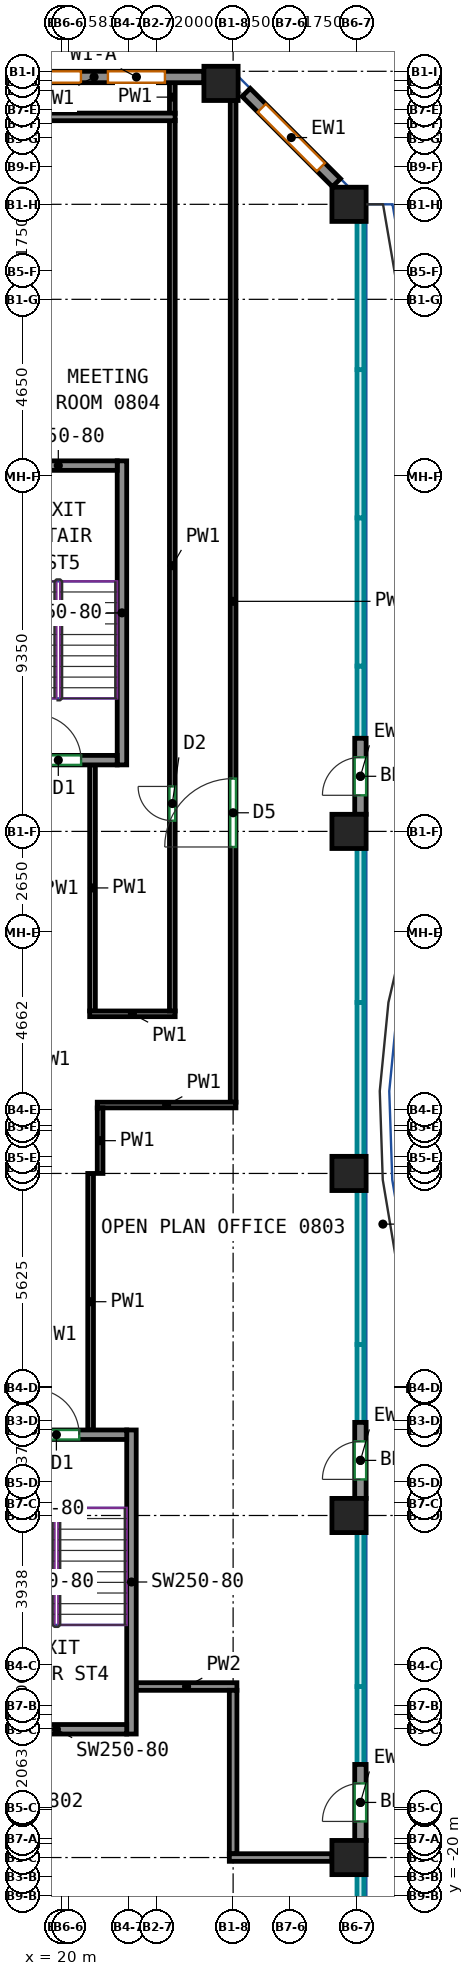
"""IFC4 building model, lengths in metres.
Left out: names, types, materials, properties, quantities, classifications, styles, units other than length and angle.
Written with IfcOpenShell. Run it as: python <this file> out.ifc"""

import sys

from ifc_helpers import new_model, si_unit, direction, frame, frame_2d, origin, origin_2d, place, context, subcontext, project, spatial, rectangle, extrude, source, transform, mapped, element, fill, save


model = new_model("IFC4")
c1 = context("Model", 3, precision=1e-05, world=origin(), true_north=direction((0.0, 1.0)))
c2 = subcontext(c1, "Body", "Model", "MODEL_VIEW")
j1 = project(units=[si_unit("LENGTHUNIT", "METRE"), si_unit("PLANEANGLEUNIT", "RADIAN")], contexts=[c1])
p1 = place(None, origin())
s1 = spatial("IfcSite", under=j1, at=p1, CompositionType="ELEMENT")
p2 = place(p1, origin())
s2 = spatial("IfcBuilding", under=s1, at=p2, CompositionType="ELEMENT")
p3 = place(p2, frame((0.0, 0.0, 39.0)))
s3 = spatial("IfcBuildingStorey", under=s2, at=p3, CompositionType="ELEMENT", Elevation=39.0)
m1 = source(origin(), c2, "Body", "SweptSolid", [
    extrude(rectangle(XDim=0.9, YDim=0.9, at=origin_2d()), origin(), (0.0, 0.0, 1.0), 3.72),
])
for number, where, z_axis, x_axis in (
    (1, (24.182, 27.682, 0.0), (0.0, 0.0, 1.0), (1.0, 0.0, 0.0)),
    (2, (27.55, -19.0, 0.0), (0.0, 0.0, 1.0), (1.0, 0.0, 0.0)),
    (3, (27.55, -10.0, 0.0), (0.0, 0.0, 1.0), (1.0, 0.0, 0.0)),
    (4, (27.55, -1.0, 0.0), (0.0, 0.0, 1.0), (1.0, 0.0, 0.0)),
    (5, (27.55, 8.0, 0.0), (0.0, 0.0, 1.0), (1.0, 0.0, 0.0)),
    (6, (27.55, 24.5, 0.0), (0.0, 0.0, 1.0), (1.0, 0.0, 0.0)),
):
    element("IfcColumn", number, at=place(p3, frame(where, z_axis=z_axis, x_axis=x_axis)), inside=s3, PredefinedType="COLUMN", context=c2, shape_type="MappedRepresentation", body=[
        mapped(m1, transform((0.0, 0.0, 0.0))),
    ])
m2 = source(origin(), c2, "Body", "SweptSolid", [
    extrude(rectangle(XDim=8.0, YDim=0.25, at=frame_2d((4.0, 0.0))), origin(), (0.0, 0.0, 1.0), 3.72),
])
p4 = place(p3, frame((21.825, -15.75, 0.0), z_axis=(0.0, 0.0, 1.0), x_axis=(0.0, 1.0, 0.0)))
e7 = element("IfcWall", 7, at=p4, inside=s3, PredefinedType="SHEAR", context=c2, shape_type="MappedRepresentation", body=[
    mapped(m2, transform((0.0, 0.0, 0.0))),
])
m3 = source(origin(), c2, "Body", "SweptSolid", [
    extrude(rectangle(XDim=3.7, YDim=0.25, at=frame_2d((1.85, 0.0))), origin(), (0.0, 0.0, 1.0), 3.72),
])
p5 = place(p3, frame((18.0, -15.625, 0.0), z_axis=(0.0, 0.0, 1.0), x_axis=(1.0, 0.0, 0.0)))
e8 = element("IfcWall", 8, at=p5, inside=s3, PredefinedType="SHEAR", context=c2, shape_type="MappedRepresentation", body=[
    mapped(m3, transform((0.0, 0.0, 0.0))),
])
p6 = place(p3, frame((18.0, -7.875, 0.0), z_axis=(0.0, 0.0, 1.0), x_axis=(1.0, 0.0, 0.0)))
e9 = element("IfcWall", 9, at=p6, inside=s3, PredefinedType="SHEAR", context=c2, shape_type="MappedRepresentation", body=[
    mapped(m3, transform((0.0, 0.0, 0.0))),
])
p7 = place(p6, frame((1.25, 0.0, 0.0)))
e10 = element("IfcOpeningElement", 10, at=p7, cuts=e9, PredefinedType="OPENING", context=c2, shape_type="SweptSolid", body=[
    extrude(rectangle(XDim=1.2, YDim=2.1, at=frame_2d((0.6, 1.05))), frame((0.0, 0.135, 0.0), z_axis=(0.0, -1.0, 0.0), x_axis=(1.0, 0.0, 0.0)), (0.0, 0.0, 1.0), 0.27),
])
p8 = place(p3, frame((21.575, 9.75, 0.0), z_axis=(0.0, 0.0, 1.0), x_axis=(0.0, 1.0, 0.0)))
e11 = element("IfcWall", 11, at=p8, inside=s3, PredefinedType="SHEAR", context=c2, shape_type="MappedRepresentation", body=[
    mapped(m2, transform((0.0, 0.0, 0.0))),
])
m4 = source(origin(), c2, "Body", "SweptSolid", [
    extrude(rectangle(XDim=3.1, YDim=0.25, at=frame_2d((1.55, 0.0))), origin(), (0.0, 0.0, 1.0), 3.72),
])
p9 = place(p3, frame((18.35, 9.875, 0.0), z_axis=(0.0, 0.0, 1.0), x_axis=(1.0, 0.0, 0.0)))
e12 = element("IfcWall", 12, at=p9, inside=s3, PredefinedType="SHEAR", context=c2, shape_type="MappedRepresentation", body=[
    mapped(m4, transform((0.0, 0.0, 0.0))),
])
p10 = place(p9, frame((0.95, 0.0, 0.0)))
e13 = element("IfcOpeningElement", 13, at=p10, cuts=e12, PredefinedType="OPENING", context=c2, shape_type="SweptSolid", body=[
    extrude(rectangle(XDim=1.2, YDim=2.1, at=frame_2d((0.6, 1.05))), frame((0.0, 0.135, 0.0), z_axis=(0.0, -1.0, 0.0), x_axis=(1.0, 0.0, 0.0)), (0.0, 0.0, 1.0), 0.27),
])
p11 = place(p3, frame((18.35, 17.625, 0.0), z_axis=(0.0, 0.0, 1.0), x_axis=(1.0, 0.0, 0.0)))
e14 = element("IfcWall", 14, at=p11, inside=s3, PredefinedType="SHEAR", context=c2, shape_type="MappedRepresentation", body=[
    mapped(m4, transform((0.0, 0.0, 0.0))),
])
m5 = source(origin(), c2, "Body", "SweptSolid", [
    extrude(rectangle(XDim=2.0, YDim=0.3, at=frame_2d((1.0, 0.0))), origin(), (0.0, 0.0, 1.0), 3.72),
])
p12 = place(p3, frame((27.85, -18.55, 0.0), z_axis=(0.0, 0.0, 1.0), x_axis=(0.0, 1.0, 0.0)))
e15 = element("IfcWall", 15, at=p12, inside=s3, PredefinedType="SOLIDWALL", context=c2, shape_type="MappedRepresentation", body=[
    mapped(m5, transform((0.0, 0.0, 0.0))),
])
p13 = place(p12, frame((0.5, 0.0, 0.0)))
e16 = element("IfcOpeningElement", 16, at=p13, cuts=e15, PredefinedType="OPENING", context=c2, shape_type="SweptSolid", body=[
    extrude(rectangle(XDim=1.0, YDim=2.1, at=frame_2d((0.5, 1.05))), frame((0.0, 0.16, 0.0), z_axis=(0.0, -1.0, 0.0), x_axis=(1.0, 0.0, 0.0)), (0.0, 0.0, 1.0), 0.32),
])
p14 = place(p3, frame((27.85, -9.55, 0.0), z_axis=(0.0, 0.0, 1.0), x_axis=(0.0, 1.0, 0.0)))
e17 = element("IfcWall", 17, at=p14, inside=s3, PredefinedType="SOLIDWALL", context=c2, shape_type="MappedRepresentation", body=[
    mapped(m5, transform((0.0, 0.0, 0.0))),
])
p15 = place(p14, frame((0.5, 0.0, 0.0)))
e18 = element("IfcOpeningElement", 18, at=p15, cuts=e17, PredefinedType="OPENING", context=c2, shape_type="SweptSolid", body=[
    extrude(rectangle(XDim=1.0, YDim=2.1, at=frame_2d((0.5, 1.05))), frame((0.0, 0.16, 0.0), z_axis=(0.0, -1.0, 0.0), x_axis=(1.0, 0.0, 0.0)), (0.0, 0.0, 1.0), 0.32),
])
p16 = place(p3, frame((27.85, 8.45, 0.0), z_axis=(0.0, 0.0, 1.0), x_axis=(0.0, 1.0, 0.0)))
e19 = element("IfcWall", 19, at=p16, inside=s3, PredefinedType="SOLIDWALL", context=c2, shape_type="MappedRepresentation", body=[
    mapped(m5, transform((0.0, 0.0, 0.0))),
])
p17 = place(p16, frame((0.5, 0.0, 0.0)))
e20 = element("IfcOpeningElement", 20, at=p17, cuts=e19, PredefinedType="OPENING", context=c2, shape_type="SweptSolid", body=[
    extrude(rectangle(XDim=1.0, YDim=2.1, at=frame_2d((0.5, 1.05))), frame((0.0, 0.16, 0.0), z_axis=(0.0, -1.0, 0.0), x_axis=(1.0, 0.0, 0.0)), (0.0, 0.0, 1.0), 0.32),
])
m6 = source(origin(), c2, "Body", "SweptSolid", [
    extrude(rectangle(XDim=3.359, YDim=0.3, at=frame_2d((1.679, 0.0))), origin(), (0.0, 0.0, 1.0), 3.72),
])
p18 = place(p3, frame((27.219, 25.069, 0.0), z_axis=(0.0, 0.0, 1.0), x_axis=(-0.707070438228, 0.707143122278, 0.0)))
e21 = element("IfcWall", 21, at=p18, inside=s3, PredefinedType="SOLIDWALL", context=c2, shape_type="MappedRepresentation", body=[
    mapped(m6, transform((0.0, 0.0, 0.0))),
])
p19 = place(p18, frame((0.579, 0.0, 0.7)))
e22 = element("IfcOpeningElement", 22, at=p19, cuts=e21, PredefinedType="OPENING", context=c2, shape_type="SweptSolid", body=[
    extrude(rectangle(XDim=2.2, YDim=2.25, at=frame_2d((1.1, 1.125))), frame((0.0, 0.16, 0.0), z_axis=(0.0, -1.0, 0.0), x_axis=(1.0, 0.0, 0.0)), (0.0, 0.0, 1.0), 0.32),
])
m7 = source(origin(), c2, "Body", "SweptSolid", [
    extrude(rectangle(XDim=5.782, YDim=0.3, at=frame_2d((2.891, 0.0))), origin(), (0.0, 0.0, 1.0), 3.72),
])
p20 = place(p3, frame((23.732, 27.85, 0.0), z_axis=(0.0, 0.0, 1.0), x_axis=(-1.0, 0.0, 0.0)))
e23 = element("IfcWall", 23, at=p20, inside=s3, PredefinedType="SOLIDWALL", context=c2, shape_type="MappedRepresentation", body=[
    mapped(m7, transform((0.0, 0.0, 0.0))),
])
p21 = place(p20, frame((1.026, 0.0, 0.7)))
e24 = element("IfcOpeningElement", 24, at=p21, cuts=e23, PredefinedType="OPENING", context=c2, shape_type="SweptSolid", body=[
    extrude(rectangle(XDim=1.5, YDim=2.25, at=frame_2d((0.75, 1.125))), frame((0.0, 0.16, 0.0), z_axis=(0.0, -1.0, 0.0), x_axis=(1.0, 0.0, 0.0)), (0.0, 0.0, 1.0), 0.32),
])
p22 = place(p20, frame((3.236, 0.0, 0.7)))
e25 = element("IfcOpeningElement", 25, at=p22, cuts=e23, PredefinedType="OPENING", context=c2, shape_type="SweptSolid", body=[
    extrude(rectangle(XDim=2.2, YDim=2.25, at=frame_2d((1.1, 1.125))), frame((0.0, 0.16, 0.0), z_axis=(0.0, -1.0, 0.0), x_axis=(1.0, 0.0, 0.0)), (0.0, 0.0, 1.0), 0.32),
])
p23 = place(p3, frame((20.8, 3.275, 0.0), z_axis=(0.0, 0.0, 1.0), x_axis=(0.0, 1.0, 0.0)))
e26 = element("IfcWall", 26, at=p23, inside=s3, PredefinedType="PARTITIONING", context=c2, shape_type="SweptSolid", body=[
    extrude(rectangle(XDim=6.475, YDim=0.15, at=frame_2d((3.238, 0.0))), origin(), (0.0, 0.0, 1.0), 3.72),
])
p24 = place(p3, frame((20.725, 3.2, 0.0), z_axis=(0.0, 0.0, 1.0), x_axis=(1.0, 0.0, 0.0)))
e27 = element("IfcWall", 27, at=p24, inside=s3, PredefinedType="PARTITIONING", context=c2, shape_type="SweptSolid", body=[
    extrude(rectangle(XDim=2.25, YDim=0.15, at=frame_2d((1.125, 0.0))), origin(), (0.0, 0.0, 1.0), 3.72),
])
p25 = place(p3, frame((22.9, 3.275, 0.0), z_axis=(0.0, 0.0, 1.0), x_axis=(0.0, 1.0, 0.0)))
e28 = element("IfcWall", 28, at=p25, inside=s3, PredefinedType="PARTITIONING", context=c2, shape_type="SweptSolid", body=[
    extrude(rectangle(XDim=23.435, YDim=0.15, at=frame_2d((11.718, 0.0))), origin(), (0.0, 0.0, 1.0), 3.72),
])
p26 = place(p25, frame((5.008, 0.0, 0.0)))
e29 = element("IfcOpeningElement", 29, at=p26, cuts=e28, PredefinedType="OPENING", context=c2, shape_type="SweptSolid", body=[
    extrude(rectangle(XDim=0.9, YDim=2.1, at=frame_2d((0.45, 1.05))), frame((0.0, 0.085, 0.0), z_axis=(0.0, -1.0, 0.0), x_axis=(1.0, 0.0, 0.0)), (0.0, 0.0, 1.0), 0.17),
])
p27 = place(p3, frame((24.5, 0.875, 0.0), z_axis=(0.0, 0.0, 1.0), x_axis=(0.0, 1.0, 0.0)))
e30 = element("IfcWall", 30, at=p27, inside=s3, PredefinedType="PARTITIONING", context=c2, shape_type="SweptSolid", body=[
    extrude(rectangle(XDim=26.357, YDim=0.15, at=frame_2d((13.178, 0.0))), origin(), (0.0, 0.0, 1.0), 3.07),
])
p28 = place(p27, frame((6.715, 0.0, 0.0)))
e31 = element("IfcOpeningElement", 31, at=p28, cuts=e30, PredefinedType="OPENING", context=c2, shape_type="SweptSolid", body=[
    extrude(rectangle(XDim=1.8, YDim=2.1, at=frame_2d((0.9, 1.05))), frame((0.0, 0.085, 0.0), z_axis=(0.0, -1.0, 0.0), x_axis=(1.0, 0.0, 0.0)), (0.0, 0.0, 1.0), 0.17),
])
p29 = place(p3, frame((20.925, 0.8, 0.0), z_axis=(0.0, 0.0, 1.0), x_axis=(1.0, 0.0, 0.0)))
e32 = element("IfcWall", 32, at=p29, inside=s3, PredefinedType="PARTITIONING", context=c2, shape_type="SweptSolid", body=[
    extrude(rectangle(XDim=3.65, YDim=0.15, at=frame_2d((1.825, 0.0))), origin(), (0.0, 0.0, 1.0), 3.72),
])
p30 = place(p3, frame((21.0, -1.0, 0.0), z_axis=(0.0, 0.0, 1.0), x_axis=(0.0, 1.0, 0.0)))
e33 = element("IfcWall", 33, at=p30, inside=s3, PredefinedType="PARTITIONING", context=c2, shape_type="SweptSolid", body=[
    extrude(rectangle(XDim=1.725, YDim=0.15, at=frame_2d((0.863, 0.0))), origin(), (0.0, 0.0, 1.0), 3.72),
])
p31 = place(p3, frame((20.75, -7.75, 0.0), z_axis=(0.0, 0.0, 1.0), x_axis=(0.0, 1.0, 0.0)))
e34 = element("IfcWall", 34, at=p31, inside=s3, PredefinedType="PARTITIONING", context=c2, shape_type="SweptSolid", body=[
    extrude(rectangle(XDim=6.75, YDim=0.15, at=frame_2d((3.375, 0.0))), origin(), (0.0, 0.0, 1.0), 3.72),
])
p32 = place(p3, frame((22.9, 26.891, 0.0), z_axis=(0.0, 0.0, 1.0), x_axis=(0.0, 1.0, 0.0)))
e35 = element("IfcWall", 35, at=p32, inside=s3, PredefinedType="PARTITIONING", context=c2, shape_type="SweptSolid", body=[
    extrude(rectangle(XDim=0.859, YDim=0.15, at=frame_2d((0.429, 0.0))), origin(), (0.0, 0.0, 1.0), 3.72),
])
p33 = place(p3, frame((-20.874, 26.8, 0.0), z_axis=(0.0, 0.0, 1.0), x_axis=(1.0, 0.0, 0.0)))
e36 = element("IfcWall", 36, at=p33, inside=s3, PredefinedType="PARTITIONING", context=c2, shape_type="SweptSolid", body=[
    extrude(rectangle(XDim=43.848, YDim=0.2, at=frame_2d((21.924, 0.0))), origin(), (0.0, 0.0, 1.0), 3.72),
])
p34 = place(p33, frame((31.863, 0.0, 0.0)))
e37 = element("IfcOpeningElement", 37, at=p34, cuts=e36, PredefinedType="OPENING", context=c2, shape_type="SweptSolid", body=[
    extrude(rectangle(XDim=1.0, YDim=2.1, at=frame_2d((0.5, 1.05))), frame((0.0, 0.11, 0.0), z_axis=(0.0, -1.0, 0.0), x_axis=(1.0, 0.0, 0.0)), (0.0, 0.0, 1.0), 0.22),
])
p35 = place(p3, frame((24.6, -14.5, 0.0), z_axis=(0.0, 0.0, 1.0), x_axis=(-1.0, 0.0, 0.0)))
e38 = element("IfcWall", 38, at=p35, inside=s3, PredefinedType="PARTITIONING", context=c2, shape_type="SweptSolid", body=[
    extrude(rectangle(XDim=2.65, YDim=0.2, at=frame_2d((1.325, 0.0))), origin(), (0.0, 0.0, 1.0), 3.72),
])
p36 = place(p3, frame((24.5, -18.9, 0.0), z_axis=(0.0, 0.0, 1.0), x_axis=(0.0, 1.0, 0.0)))
e39 = element("IfcWall", 39, at=p36, inside=s3, PredefinedType="PARTITIONING", context=c2, shape_type="SweptSolid", body=[
    extrude(rectangle(XDim=4.3, YDim=0.2, at=frame_2d((2.15, 0.0))), origin(), (0.0, 0.0, 1.0), 3.07),
])
p37 = place(p3, frame((27.1, -19.0, 0.0), z_axis=(0.0, 0.0, 1.0), x_axis=(-1.0, 0.0, 0.0)))
e40 = element("IfcWall", 40, at=p37, inside=s3, PredefinedType="PARTITIONING", context=c2, shape_type="SweptSolid", body=[
    extrude(rectangle(XDim=2.7, YDim=0.2, at=frame_2d((1.35, 0.0))), origin(), (0.0, 0.0, 1.0), 3.07),
])
p38 = place(p13, origin())
e41 = element("IfcDoor", 41, at=p38, inside=s3, OperationType="SINGLE_SWING_LEFT", PredefinedType="DOOR", context=c2, shape_type="SweptSolid", body=[
    extrude(rectangle(XDim=1.0, YDim=2.1, at=frame_2d((0.5, 1.05))), frame((0.0, 0.025, 0.0), z_axis=(0.0, -1.0, 0.0), x_axis=(1.0, 0.0, 0.0)), (0.0, 0.0, 1.0), 0.05),
])
fill(e16, e41)
p39 = place(p15, origin())
e42 = element("IfcDoor", 42, at=p39, inside=s3, OperationType="SINGLE_SWING_LEFT", PredefinedType="DOOR", context=c2, shape_type="SweptSolid", body=[
    extrude(rectangle(XDim=1.0, YDim=2.1, at=frame_2d((0.5, 1.05))), frame((0.0, 0.025, 0.0), z_axis=(0.0, -1.0, 0.0), x_axis=(1.0, 0.0, 0.0)), (0.0, 0.0, 1.0), 0.05),
])
fill(e18, e42)
p40 = place(p17, origin())
e43 = element("IfcDoor", 43, at=p40, inside=s3, OperationType="SINGLE_SWING_LEFT", PredefinedType="DOOR", context=c2, shape_type="SweptSolid", body=[
    extrude(rectangle(XDim=1.0, YDim=2.1, at=frame_2d((0.5, 1.05))), frame((0.0, 0.025, 0.0), z_axis=(0.0, -1.0, 0.0), x_axis=(1.0, 0.0, 0.0)), (0.0, 0.0, 1.0), 0.05),
])
fill(e20, e43)
p41 = place(p19, origin())
e44 = element("IfcWindow", 44, at=p41, inside=s3, PartitioningType="SINGLE_PANEL", PredefinedType="WINDOW", context=c2, shape_type="SweptSolid", body=[
    extrude(rectangle(XDim=2.2, YDim=2.25, at=frame_2d((1.1, 1.125))), frame((0.0, 0.03, 0.0), z_axis=(0.0, -1.0, 0.0), x_axis=(1.0, 0.0, 0.0)), (0.0, 0.0, 1.0), 0.06),
])
fill(e22, e44)
p42 = place(p21, origin())
e45 = element("IfcWindow", 45, at=p42, inside=s3, PartitioningType="SINGLE_PANEL", PredefinedType="WINDOW", context=c2, shape_type="SweptSolid", body=[
    extrude(rectangle(XDim=1.5, YDim=2.25, at=frame_2d((0.75, 1.125))), frame((0.0, 0.03, 0.0), z_axis=(0.0, -1.0, 0.0), x_axis=(1.0, 0.0, 0.0)), (0.0, 0.0, 1.0), 0.06),
])
fill(e24, e45)
p43 = place(p22, origin())
e46 = element("IfcWindow", 46, at=p43, inside=s3, PartitioningType="SINGLE_PANEL", PredefinedType="WINDOW", context=c2, shape_type="SweptSolid", body=[
    extrude(rectangle(XDim=2.2, YDim=2.25, at=frame_2d((1.1, 1.125))), frame((0.0, 0.03, 0.0), z_axis=(0.0, -1.0, 0.0), x_axis=(1.0, 0.0, 0.0)), (0.0, 0.0, 1.0), 0.06),
])
fill(e25, e46)
p44 = place(p7, origin())
e47 = element("IfcDoor", 47, at=p44, inside=s3, OperationType="DOUBLE_DOOR_SINGLE_SWING", PredefinedType="DOOR", context=c2, shape_type="SweptSolid", body=[
    extrude(rectangle(XDim=1.2, YDim=2.1, at=frame_2d((0.6, 1.05))), frame((0.0, 0.025, 0.0), z_axis=(0.0, -1.0, 0.0), x_axis=(1.0, 0.0, 0.0)), (0.0, 0.0, 1.0), 0.05),
])
fill(e10, e47)
p45 = place(p10, origin())
e48 = element("IfcDoor", 48, at=p45, inside=s3, OperationType="DOUBLE_DOOR_SINGLE_SWING", PredefinedType="DOOR", context=c2, shape_type="SweptSolid", body=[
    extrude(rectangle(XDim=1.2, YDim=2.1, at=frame_2d((0.6, 1.05))), frame((0.0, 0.025, 0.0), z_axis=(0.0, -1.0, 0.0), x_axis=(1.0, 0.0, 0.0)), (0.0, 0.0, 1.0), 0.05),
])
fill(e13, e48)
p46 = place(p28, origin())
e49 = element("IfcDoor", 49, at=p46, inside=s3, OperationType="DOUBLE_DOOR_SINGLE_SWING", PredefinedType="DOOR", context=c2, shape_type="SweptSolid", body=[
    extrude(rectangle(XDim=1.8, YDim=2.1, at=frame_2d((0.9, 1.05))), frame((0.0, 0.025, 0.0), z_axis=(0.0, -1.0, 0.0), x_axis=(1.0, 0.0, 0.0)), (0.0, 0.0, 1.0), 0.05),
])
fill(e31, e49)
p47 = place(p26, origin())
e50 = element("IfcDoor", 50, at=p47, inside=s3, OperationType="SINGLE_SWING_RIGHT", PredefinedType="DOOR", context=c2, shape_type="SweptSolid", body=[
    extrude(rectangle(XDim=0.9, YDim=2.1, at=frame_2d((0.45, 1.05))), frame((0.0, 0.025, 0.0), z_axis=(0.0, -1.0, 0.0), x_axis=(1.0, 0.0, 0.0)), (0.0, 0.0, 1.0), 0.05),
])
fill(e29, e50)
save(model, sys.argv[1])
